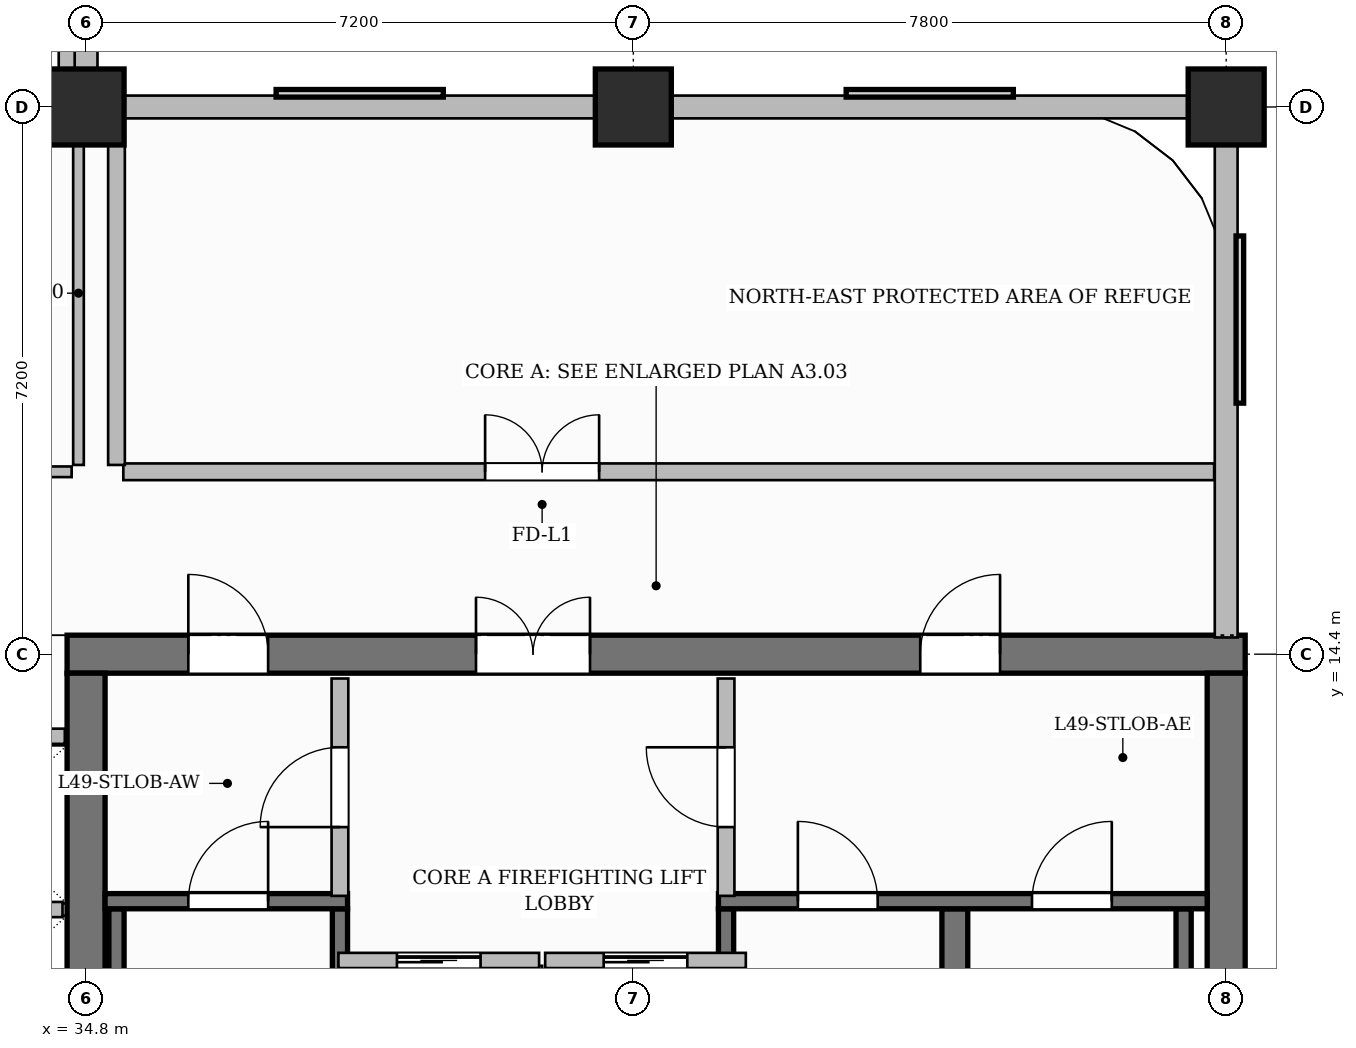
"""IFC4 building model, lengths in metres.
Left out: names, types, materials, properties, quantities, classifications, styles, units other than length and angle.
Written with IfcOpenShell. Run it as: python <this file> out.ifc"""

import sys

from ifc_helpers import new_model, si_unit, direction, frame, frame_2d, origin, origin_2d, place, context, subcontext, project, spatial, rectangle, extrude, source, transform, mapped, element, fill, save


model = new_model("IFC4")
c1 = context("Model", 3, precision=1e-05, world=origin(), true_north=direction((0.0, 1.0)))
c2 = subcontext(c1, "Body", "Model", "MODEL_VIEW")
j1 = project(units=[si_unit("LENGTHUNIT", "METRE"), si_unit("PLANEANGLEUNIT", "RADIAN")], contexts=[c1])
p1 = place(None, origin())
s1 = spatial("IfcSite", under=j1, at=p1, CompositionType="ELEMENT")
p2 = place(p1, origin())
s2 = spatial("IfcBuilding", under=s1, at=p2, CompositionType="ELEMENT")
p3 = place(p2, frame((0.0, 0.0, 196.5)))
s3 = spatial("IfcBuildingStorey", under=s2, at=p3, CompositionType="ELEMENT", Elevation=196.5)
p4 = place(p3, frame((34.55, 14.4, 0.0), z_axis=(0.0, 0.0, 1.0), x_axis=(1.0, 0.0, 0.0)))
e1 = element("IfcWall", 1, at=p4, inside=s3, PredefinedType="SHEAR", context=c2, shape_type="SweptSolid", body=[
    extrude(rectangle(XDim=15.5, YDim=0.5, at=frame_2d((7.75, 0.0))), origin(), (0.0, 0.0, 1.0), 5.4),
])
p5 = place(p4, frame((5.38, 0.0, 0.0)))
e2 = element("IfcOpeningElement", 2, at=p5, cuts=e1, PredefinedType="OPENING", context=c2, shape_type="SweptSolid", body=[
    extrude(rectangle(XDim=1.5, YDim=2.2, at=frame_2d((0.75, 1.1))), frame((0.0, 0.26, 0.0), z_axis=(0.0, -1.0, 0.0), x_axis=(1.0, 0.0, 0.0)), (0.0, 0.0, 1.0), 0.52),
])
p6 = place(p4, frame((1.595, 0.0, 0.0)))
e3 = element("IfcOpeningElement", 3, at=p6, cuts=e1, PredefinedType="OPENING", context=c2, shape_type="SweptSolid", body=[
    extrude(rectangle(XDim=1.05, YDim=2.15, at=frame_2d((0.525, 1.075))), frame((0.0, 0.26, 0.0), z_axis=(0.0, -1.0, 0.0), x_axis=(1.0, 0.0, 0.0)), (0.0, 0.0, 1.0), 0.52),
])
p7 = place(p4, frame((11.225, 0.0, 0.0)))
e4 = element("IfcOpeningElement", 4, at=p7, cuts=e1, PredefinedType="OPENING", context=c2, shape_type="SweptSolid", body=[
    extrude(rectangle(XDim=1.05, YDim=2.15, at=frame_2d((0.525, 1.075))), frame((0.0, 0.26, 0.0), z_axis=(0.0, -1.0, 0.0), x_axis=(1.0, 0.0, 0.0)), (0.0, 0.0, 1.0), 0.52),
])
for number, where, z_axis, x_axis in (
    (5, (34.8, 3.85, 0.0), (0.0, 0.0, 1.0), (0.0, 1.0, 0.0)),
    (6, (49.8, 3.85, 0.0), (0.0, 0.0, 1.0), (0.0, 1.0, 0.0)),
):
    element("IfcWall", number, at=place(p3, frame(where, z_axis=z_axis, x_axis=x_axis)), inside=s3, PredefinedType="SHEAR", context=c2, shape_type="SweptSolid", body=[
        extrude(rectangle(XDim=10.3, YDim=0.5, at=frame_2d((5.15, 0.0))), origin(), (0.0, 0.0, 1.0), 5.4),
    ])
m1 = source(origin(), c2, "Body", "SweptSolid", [
    extrude(rectangle(XDim=1.0, YDim=1.0, at=origin_2d()), origin(), (0.0, 0.0, 1.0), 5.4),
])
for number, where, z_axis, x_axis in (
    (7, (34.8, 21.6, 0.0), (0.0, 0.0, 1.0), (1.0, 0.0, 0.0)),
    (8, (42.0, 21.6, 0.0), (0.0, 0.0, 1.0), (1.0, 0.0, 0.0)),
    (9, (49.8, 21.6, 0.0), (0.0, 0.0, 1.0), (1.0, 0.0, 0.0)),
):
    element("IfcColumn", number, at=place(p3, frame(where, z_axis=z_axis, x_axis=x_axis)), inside=s3, PredefinedType="COLUMN", context=c2, shape_type="MappedRepresentation", body=[
        mapped(m1, transform((0.0, 0.0, 0.0), scale=1.0)),
    ])
for number, where, z_axis, x_axis in (
    (10, (35.2, 4.1, 0.0), (0.0, 0.0, 1.0), (0.0, 1.0, 0.0)),
    (11, (38.14, 4.1, 0.0), (0.0, 0.0, 1.0), (0.0, 1.0, 0.0)),
):
    element("IfcWall", number, at=place(p3, frame(where, z_axis=z_axis, x_axis=x_axis)), inside=s3, PredefinedType="SHEAR", context=c2, shape_type="SweptSolid", body=[
        extrude(rectangle(XDim=6.95, YDim=0.2, at=frame_2d((3.475, 0.0))), origin(), (0.0, 0.0, 1.0), 5.4),
    ])
p8 = place(p3, frame((35.05, 11.15, 0.0), z_axis=(0.0, 0.0, 1.0), x_axis=(1.0, 0.0, 0.0)))
e12 = element("IfcWall", 12, at=p8, inside=s3, PredefinedType="SHEAR", context=c2, shape_type="SweptSolid", body=[
    extrude(rectangle(XDim=3.19, YDim=0.2, at=frame_2d((1.595, 0.0))), origin(), (0.0, 0.0, 1.0), 5.4),
])
p9 = place(p8, frame((1.095, 0.0, 0.0)))
e13 = element("IfcOpeningElement", 13, at=p9, cuts=e12, PredefinedType="OPENING", context=c2, shape_type="SweptSolid", body=[
    extrude(rectangle(XDim=1.05, YDim=2.2, at=frame_2d((0.525, 1.1))), frame((0.0, 0.11, 0.0), z_axis=(0.0, -1.0, 0.0), x_axis=(1.0, 0.0, 0.0)), (0.0, 0.0, 1.0), 0.22),
])
p10 = place(p3, frame((43.22, 4.1, 0.0), z_axis=(0.0, 0.0, 1.0), x_axis=(0.0, 1.0, 0.0)))
e14 = element("IfcWall", 14, at=p10, inside=s3, PredefinedType="SHEAR", context=c2, shape_type="SweptSolid", body=[
    extrude(rectangle(XDim=6.95, YDim=0.2, at=frame_2d((3.475, 0.0))), origin(), (0.0, 0.0, 1.0), 5.4),
])
p11 = place(p3, frame((46.23, 4.1, 0.0), z_axis=(0.0, 0.0, 1.0), x_axis=(0.0, 1.0, 0.0)))
e15 = element("IfcWall", 15, at=p11, inside=s3, PredefinedType="SHEAR", context=c2, shape_type="SweptSolid", body=[
    extrude(rectangle(XDim=6.95, YDim=0.34, at=frame_2d((3.475, 0.0))), origin(), (0.0, 0.0, 1.0), 5.4),
])
p12 = place(p3, frame((49.24, 4.1, 0.0), z_axis=(0.0, 0.0, 1.0), x_axis=(0.0, 1.0, 0.0)))
e16 = element("IfcWall", 16, at=p12, inside=s3, PredefinedType="SHEAR", context=c2, shape_type="SweptSolid", body=[
    extrude(rectangle(XDim=6.95, YDim=0.2, at=frame_2d((3.475, 0.0))), origin(), (0.0, 0.0, 1.0), 5.4),
])
p13 = place(p3, frame((43.12, 11.15, 0.0), z_axis=(0.0, 0.0, 1.0), x_axis=(1.0, 0.0, 0.0)))
e17 = element("IfcWall", 17, at=p13, inside=s3, PredefinedType="SHEAR", context=c2, shape_type="SweptSolid", body=[
    extrude(rectangle(XDim=6.43, YDim=0.2, at=frame_2d((3.215, 0.0))), origin(), (0.0, 0.0, 1.0), 5.4),
])
p14 = place(p13, frame((1.045, 0.0, 0.0)))
e18 = element("IfcOpeningElement", 18, at=p14, cuts=e17, PredefinedType="OPENING", context=c2, shape_type="SweptSolid", body=[
    extrude(rectangle(XDim=1.05, YDim=2.2, at=frame_2d((0.525, 1.1))), frame((0.0, 0.11, 0.0), z_axis=(0.0, -1.0, 0.0), x_axis=(1.0, 0.0, 0.0)), (0.0, 0.0, 1.0), 0.22),
])
p15 = place(p13, frame((4.125, 0.0, 0.0)))
e19 = element("IfcOpeningElement", 19, at=p15, cuts=e17, PredefinedType="OPENING", context=c2, shape_type="SweptSolid", body=[
    extrude(rectangle(XDim=1.05, YDim=2.2, at=frame_2d((0.525, 1.1))), frame((0.0, 0.11, 0.0), z_axis=(0.0, -1.0, 0.0), x_axis=(1.0, 0.0, 0.0)), (0.0, 0.0, 1.0), 0.22),
])
p16 = place(p3, frame((40.7, 8.12, 0.0), z_axis=(0.0, 0.0, 1.0), x_axis=(0.0, 1.0, 0.0)))
e20 = element("IfcWall", 20, at=p16, inside=s3, PredefinedType="PARTITIONING", context=c2, shape_type="SweptSolid", body=[
    extrude(rectangle(XDim=2.18, YDim=0.2, at=frame_2d((1.09, 0.0))), origin(), (0.0, 0.0, 1.0), 5.15),
])
p17 = place(p3, frame((38.14, 11.22, 0.0), z_axis=(0.0, 0.0, 1.0), x_axis=(0.0, 1.0, 0.0)))
e21 = element("IfcWall", 21, at=p17, inside=s3, PredefinedType="PARTITIONING", context=c2, shape_type="SweptSolid", body=[
    extrude(rectangle(XDim=2.86, YDim=0.22, at=frame_2d((1.43, 0.0))), origin(), (0.0, 0.0, 1.0), 5.15),
])
p18 = place(p17, frame((0.905, 0.0, 0.0)))
e22 = element("IfcOpeningElement", 22, at=p18, cuts=e21, PredefinedType="OPENING", context=c2, shape_type="SweptSolid", body=[
    extrude(rectangle(XDim=1.05, YDim=2.15, at=frame_2d((0.525, 1.075))), frame((0.0, 0.12, 0.0), z_axis=(0.0, -1.0, 0.0), x_axis=(1.0, 0.0, 0.0)), (0.0, 0.0, 1.0), 0.24),
])
p19 = place(p3, frame((43.22, 11.22, 0.0), z_axis=(0.0, 0.0, 1.0), x_axis=(0.0, 1.0, 0.0)))
e23 = element("IfcWall", 23, at=p19, inside=s3, PredefinedType="PARTITIONING", context=c2, shape_type="SweptSolid", body=[
    extrude(rectangle(XDim=2.86, YDim=0.22, at=frame_2d((1.43, 0.0))), origin(), (0.0, 0.0, 1.0), 5.15),
])
p20 = place(p19, frame((0.905, 0.0, 0.0)))
e24 = element("IfcOpeningElement", 24, at=p20, cuts=e23, PredefinedType="OPENING", context=c2, shape_type="SweptSolid", body=[
    extrude(rectangle(XDim=1.05, YDim=2.15, at=frame_2d((0.525, 1.075))), frame((0.0, 0.12, 0.0), z_axis=(0.0, -1.0, 0.0), x_axis=(1.0, 0.0, 0.0)), (0.0, 0.0, 1.0), 0.24),
])
p21 = place(p3, frame((32.16, 13.32, 0.0), z_axis=(0.0, 0.0, 1.0), x_axis=(1.0, 0.0, 0.0)))
e25 = element("IfcWall", 25, at=p21, inside=s3, PredefinedType="PARTITIONING", context=c2, shape_type="SweptSolid", body=[
    extrude(rectangle(XDim=2.36, YDim=0.2, at=frame_2d((1.18, 0.0))), origin(), (0.0, 0.0, 1.0), 5.15),
])
p22 = place(p3, frame((32.26, 11.04, 0.0), z_axis=(0.0, 0.0, 1.0), x_axis=(1.0, 0.0, 0.0)))
e26 = element("IfcWall", 26, at=p22, inside=s3, PredefinedType="PARTITIONING", context=c2, shape_type="SweptSolid", body=[
    extrude(rectangle(XDim=2.23, YDim=0.2, at=frame_2d((1.115, 0.0))), origin(), (0.0, 0.0, 1.0), 5.15),
])
p23 = place(p3, frame((30.69, 16.8, 0.0), z_axis=(0.0, 0.0, 1.0), x_axis=(1.0, 0.0, 0.0)))
e27 = element("IfcWall", 27, at=p23, inside=s3, PredefinedType="PARTITIONING", context=c2, shape_type="SweptSolid", body=[
    extrude(rectangle(XDim=3.92, YDim=0.14, at=frame_2d((1.96, 0.0))), origin(), (0.0, 0.0, 1.0), 5.15),
])
p24 = place(p23, frame((1.535, 0.0, 0.0)))
e28 = element("IfcOpeningElement", 28, at=p24, cuts=e27, PredefinedType="OPENING", context=c2, shape_type="SweptSolid", body=[
    extrude(rectangle(XDim=0.85, YDim=2.1, at=frame_2d((0.425, 1.05))), frame((0.0, 0.08, 0.0), z_axis=(0.0, -1.0, 0.0), x_axis=(1.0, 0.0, 0.0)), (0.0, 0.0, 1.0), 0.16),
])
p25 = place(p3, frame((34.7, 16.89, 0.0), z_axis=(0.0, 0.0, 1.0), x_axis=(0.0, 1.0, 0.0)))
e29 = element("IfcWall", 29, at=p25, inside=s3, PredefinedType="PARTITIONING", context=c2, shape_type="SweptSolid", body=[
    extrude(rectangle(XDim=4.52, YDim=0.14, at=frame_2d((2.26, 0.0))), origin(), (0.0, 0.0, 1.0), 4.485),
])
p26 = place(p3, frame((35.29, 16.8, 0.0), z_axis=(0.0, 0.0, 1.0), x_axis=(1.0, 0.0, 0.0)))
e30 = element("IfcWall", 30, at=p26, inside=s3, PredefinedType="PARTITIONING", context=c2, shape_type="SweptSolid", body=[
    extrude(rectangle(XDim=14.352, YDim=0.22, at=frame_2d((7.176, 0.0))), origin(), (0.0, 0.0, 1.0), 5.15),
])
p27 = place(p26, frame((4.76, 0.0, 0.0)))
e31 = element("IfcOpeningElement", 31, at=p27, cuts=e30, PredefinedType="OPENING", context=c2, shape_type="SweptSolid", body=[
    extrude(rectangle(XDim=1.5, YDim=2.2, at=frame_2d((0.75, 1.1))), frame((0.0, 0.12, 0.0), z_axis=(0.0, -1.0, 0.0), x_axis=(1.0, 0.0, 0.0)), (0.0, 0.0, 1.0), 0.24),
])
p28 = place(p3, frame((35.2, 16.89, 0.0), z_axis=(0.0, 0.0, 1.0), x_axis=(0.0, 1.0, 0.0)))
e32 = element("IfcWall", 32, at=p28, inside=s3, PredefinedType="PARTITIONING", context=c2, shape_type="SweptSolid", body=[
    extrude(rectangle(XDim=4.52, YDim=0.22, at=frame_2d((2.26, 0.0))), origin(), (0.0, 0.0, 1.0), 5.15),
])
p29 = place(p3, frame((34.55, 21.69, 0.0), z_axis=(0.0, 0.0, 1.0), x_axis=(0.0, 1.0, 0.0)))
e33 = element("IfcWall", 33, at=p29, inside=s3, PredefinedType="PARTITIONING", context=c2, shape_type="SweptSolid", body=[
    extrude(rectangle(XDim=10.47, YDim=0.22, at=frame_2d((5.235, 0.0))), origin(), (0.0, 0.0, 1.0), 4.485),
])
p30 = place(p3, frame((38.12, 10.37, 0.0), z_axis=(0.0, 0.0, 1.0), x_axis=(1.0, 0.0, 0.0)))
e34 = element("IfcWall", 34, at=p30, inside=s3, PredefinedType="PARTITIONING", context=c2, shape_type="SweptSolid", body=[
    extrude(rectangle(XDim=2.64, YDim=0.2, at=frame_2d((1.32, 0.0))), origin(), (0.0, 0.0, 1.0), 5.15),
])
p31 = place(p30, frame((0.77, 0.0, 0.0)))
e35 = element("IfcOpeningElement", 35, at=p31, cuts=e34, PredefinedType="OPENING", context=c2, shape_type="SweptSolid", body=[
    extrude(rectangle(XDim=1.1, YDim=2.2, at=frame_2d((0.55, 1.1))), frame((0.0, 0.11, 0.0), z_axis=(0.0, -1.0, 0.0), x_axis=(1.0, 0.0, 0.0)), (0.0, 0.0, 1.0), 0.22),
])
p32 = place(p3, frame((40.84, 10.37, 0.0), z_axis=(0.0, 0.0, 1.0), x_axis=(1.0, 0.0, 0.0)))
e36 = element("IfcWall", 36, at=p32, inside=s3, PredefinedType="PARTITIONING", context=c2, shape_type="SweptSolid", body=[
    extrude(rectangle(XDim=2.64, YDim=0.2, at=frame_2d((1.32, 0.0))), origin(), (0.0, 0.0, 1.0), 5.15),
])
p33 = place(p32, frame((0.77, 0.0, 0.0)))
e37 = element("IfcOpeningElement", 37, at=p33, cuts=e36, PredefinedType="OPENING", context=c2, shape_type="SweptSolid", body=[
    extrude(rectangle(XDim=1.1, YDim=2.2, at=frame_2d((0.55, 1.1))), frame((0.0, 0.11, 0.0), z_axis=(0.0, -1.0, 0.0), x_axis=(1.0, 0.0, 0.0)), (0.0, 0.0, 1.0), 0.22),
])
p34 = place(p3, frame((49.8, 14.62, 0.0), z_axis=(0.0, 0.0, 1.0), x_axis=(0.0, 1.0, 0.0)))
e38 = element("IfcWall", 38, at=p34, inside=s3, PredefinedType="SOLIDWALL", context=c2, shape_type="SweptSolid", body=[
    extrude(rectangle(XDim=6.93, YDim=0.3, at=frame_2d((3.465, 0.0))), origin(), (0.0, 0.0, 1.0), 4.485),
])
p35 = place(p3, frame((34.8, 21.6, 0.0), z_axis=(0.0, 0.0, 1.0), x_axis=(1.0, 0.0, 0.0)))
e39 = element("IfcWall", 39, at=p35, inside=s3, PredefinedType="SOLIDWALL", context=c2, shape_type="SweptSolid", body=[
    extrude(rectangle(XDim=15.0, YDim=0.3, at=frame_2d((7.5, 0.0))), origin(), (0.0, 0.0, 1.0), 4.485),
])
p36 = place(p3, frame((34.8, 21.65, 0.0), z_axis=(0.0, 0.0, 1.0), x_axis=(0.0, 1.0, 0.0)))
e40 = element("IfcWall", 40, at=p36, inside=s3, PredefinedType="SOLIDWALL", context=c2, shape_type="SweptSolid", body=[
    extrude(rectangle(XDim=10.75, YDim=0.3, at=frame_2d((5.375, 0.0))), origin(), (0.0, 0.0, 1.0), 4.485),
])
m2 = source(origin(), c2, "Body", "SweptSolid", [
    extrude(rectangle(XDim=1.05, YDim=2.2, at=frame_2d((0.525, 1.1))), frame((0.0, 0.025, 0.0), z_axis=(0.0, -1.0, 0.0), x_axis=(1.0, 0.0, 0.0)), (0.0, 0.0, 1.0), 0.05),
])
p37 = place(p9, origin())
e41 = element("IfcDoor", 41, at=p37, inside=s3, OperationType="SINGLE_SWING_RIGHT", PredefinedType="DOOR", context=c2, shape_type="MappedRepresentation", body=[
    mapped(m2, transform((0.0, 0.0, 0.0), scale=1.0)),
])
fill(e13, e41)
p38 = place(p14, origin())
e42 = element("IfcDoor", 42, at=p38, inside=s3, OperationType="SINGLE_SWING_LEFT", PredefinedType="DOOR", context=c2, shape_type="MappedRepresentation", body=[
    mapped(m2, transform((0.0, 0.0, 0.0), scale=1.0)),
])
fill(e18, e42)
p39 = place(p15, origin())
e43 = element("IfcDoor", 43, at=p39, inside=s3, OperationType="SINGLE_SWING_RIGHT", PredefinedType="DOOR", context=c2, shape_type="MappedRepresentation", body=[
    mapped(m2, transform((0.0, 0.0, 0.0), scale=1.0)),
])
fill(e19, e43)
m3 = source(origin(), c2, "Body", "SweptSolid", [
    extrude(rectangle(XDim=1.05, YDim=2.15, at=frame_2d((0.525, 1.075))), frame((0.0, 0.025, 0.0), z_axis=(0.0, -1.0, 0.0), x_axis=(1.0, 0.0, 0.0)), (0.0, 0.0, 1.0), 0.05),
])
p40 = place(p18, origin())
e44 = element("IfcDoor", 44, at=p40, inside=s3, OperationType="SINGLE_SWING_LEFT", PredefinedType="DOOR", context=c2, shape_type="MappedRepresentation", body=[
    mapped(m3, transform((0.0, 0.0, 0.0), scale=1.0)),
])
fill(e22, e44)
p41 = place(p20, origin())
e45 = element("IfcDoor", 45, at=p41, inside=s3, OperationType="SINGLE_SWING_RIGHT", PredefinedType="DOOR", context=c2, shape_type="MappedRepresentation", body=[
    mapped(m3, transform((0.0, 0.0, 0.0), scale=1.0)),
])
fill(e24, e45)
m4 = source(origin(), c2, "Body", "SweptSolid", [
    extrude(rectangle(XDim=1.5, YDim=2.2, at=frame_2d((0.75, 1.1))), frame((0.0, 0.025, 0.0), z_axis=(0.0, -1.0, 0.0), x_axis=(1.0, 0.0, 0.0)), (0.0, 0.0, 1.0), 0.05),
])
p42 = place(p5, origin())
e46 = element("IfcDoor", 46, at=p42, inside=s3, OperationType="DOUBLE_DOOR_SINGLE_SWING", PredefinedType="DOOR", context=c2, shape_type="MappedRepresentation", body=[
    mapped(m4, transform((0.0, 0.0, 0.0), scale=1.0)),
])
fill(e2, e46)
p43 = place(p6, origin())
e47 = element("IfcDoor", 47, at=p43, inside=s3, OperationType="SINGLE_SWING_LEFT", PredefinedType="DOOR", context=c2, shape_type="MappedRepresentation", body=[
    mapped(m3, transform((0.0, 0.0, 0.0), scale=1.0)),
])
fill(e3, e47)
p44 = place(p7, origin())
e48 = element("IfcDoor", 48, at=p44, inside=s3, OperationType="SINGLE_SWING_RIGHT", PredefinedType="DOOR", context=c2, shape_type="MappedRepresentation", body=[
    mapped(m3, transform((0.0, 0.0, 0.0), scale=1.0)),
])
fill(e4, e48)
p45 = place(p27, origin())
e49 = element("IfcDoor", 49, at=p45, inside=s3, OperationType="DOUBLE_DOOR_SINGLE_SWING", PredefinedType="DOOR", context=c2, shape_type="MappedRepresentation", body=[
    mapped(m4, transform((0.0, 0.0, 0.0), scale=1.0)),
])
fill(e31, e49)
m5 = source(origin(), c2, "Body", "SweptSolid", [
    extrude(rectangle(XDim=1.1, YDim=2.2, at=frame_2d((0.55, 1.1))), frame((0.0, 0.025, 0.0), z_axis=(0.0, -1.0, 0.0), x_axis=(1.0, 0.0, 0.0)), (0.0, 0.0, 1.0), 0.05),
])
p46 = place(p31, origin())
e50 = element("IfcDoor", 50, at=p46, inside=s3, OperationType="SLIDING_TO_LEFT", PredefinedType="DOOR", context=c2, shape_type="MappedRepresentation", body=[
    mapped(m5, transform((0.0, 0.0, 0.0), scale=1.0)),
])
fill(e35, e50)
p47 = place(p33, origin())
e51 = element("IfcDoor", 51, at=p47, inside=s3, OperationType="SLIDING_TO_LEFT", PredefinedType="DOOR", context=c2, shape_type="MappedRepresentation", body=[
    mapped(m5, transform((0.0, 0.0, 0.0), scale=1.0)),
])
fill(e37, e51)
save(model, sys.argv[1])
